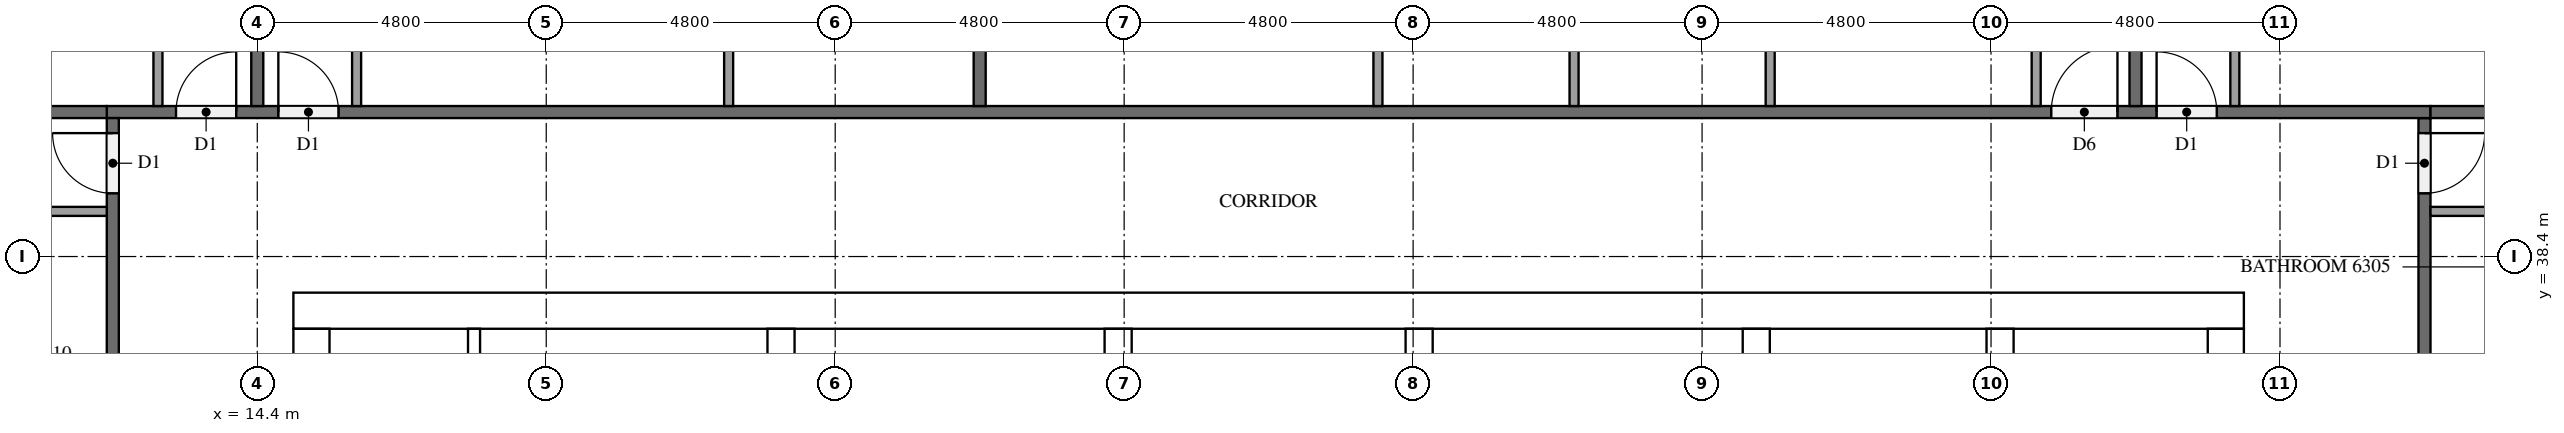
"""IFC4 building model, lengths in metres.
Left out: names, types, materials, properties, quantities, classifications, styles, units other than length and angle.
Written with IfcOpenShell. Run it as: python <this file> out.ifc"""

import sys

from ifc_helpers import new_model, si_unit, direction, frame, frame_2d, origin, place, context, subcontext, project, spatial, rectangle, extrude, element, fill, save


model = new_model("IFC4")
c1 = context("Model", 3, precision=1e-05, world=origin(), true_north=direction((0.0, 1.0)))
c2 = subcontext(c1, "Body", "Model", "MODEL_VIEW")
j1 = project(units=[si_unit("LENGTHUNIT", "METRE"), si_unit("PLANEANGLEUNIT", "RADIAN")], contexts=[c1])
p1 = place(None, origin())
s1 = spatial("IfcSite", under=j1, at=p1, CompositionType="ELEMENT")
p2 = place(p1, origin())
s2 = spatial("IfcBuilding", under=s1, at=p2, CompositionType="ELEMENT")
p3 = place(p2, frame((0.0, 0.0, 242.2)))
s3 = spatial("IfcBuildingStorey", under=s2, at=p3, CompositionType="ELEMENT", Elevation=242.2)
p4 = place(p3, frame((15.0, 37.5, 0.0), z_axis=(0.0, 0.0, 1.0), x_axis=(1.0, 0.0, 0.0)))
e1 = element("IfcWall", 1, at=p4, inside=s3, PredefinedType="SHEAR", context=c2, shape_type="SweptSolid", body=[
    extrude(rectangle(XDim=32.4, YDim=0.6, at=frame_2d((16.2, 0.0))), origin(), (0.0, 0.0, 1.0), 3.2),
])
p5 = place(p4, frame((15.3, 0.0, 0.0)))
e2 = element("IfcOpeningElement", 2, at=p5, cuts=e1, PredefinedType="OPENING", context=c2, shape_type="SweptSolid", body=[
    extrude(rectangle(XDim=1.8, YDim=2.1, at=frame_2d((0.9, 1.05))), frame((0.0, 0.31, 0.0), z_axis=(0.0, -1.0, 0.0), x_axis=(1.0, 0.0, 0.0)), (0.0, 0.0, 1.0), 0.62),
])
p6 = place(p4, frame((1.25, 0.0, 0.0)))
e3 = element("IfcOpeningElement", 3, at=p6, cuts=e1, PredefinedType="OPENING", context=c2, shape_type="SweptSolid", body=[
    extrude(rectangle(XDim=1.0, YDim=2.1, at=frame_2d((0.5, 1.05))), frame((0.0, 0.31, 0.0), z_axis=(0.0, -1.0, 0.0), x_axis=(1.0, 0.0, 0.0)), (0.0, 0.0, 1.0), 0.62),
])
p7 = place(p4, frame((4.988, 0.0, 0.0)))
e4 = element("IfcOpeningElement", 4, at=p7, cuts=e1, PredefinedType="OPENING", context=c2, shape_type="SweptSolid", body=[
    extrude(rectangle(XDim=1.0, YDim=2.1, at=frame_2d((0.5, 1.05))), frame((0.0, 0.31, 0.0), z_axis=(0.0, -1.0, 0.0), x_axis=(1.0, 0.0, 0.0)), (0.0, 0.0, 1.0), 0.62),
])
p8 = place(p3, frame((15.3, 15.6, 0.0), z_axis=(0.0, 0.0, 1.0), x_axis=(0.0, 1.0, 0.0)))
e5 = element("IfcWall", 5, at=p8, inside=s3, PredefinedType="SHEAR", context=c2, shape_type="SweptSolid", body=[
    extrude(rectangle(XDim=21.6, YDim=0.6, at=frame_2d((10.8, 0.0))), origin(), (0.0, 0.0, 1.0), 3.2),
])
p9 = place(p8, frame((5.16, 0.0, 0.0)))
e6 = element("IfcOpeningElement", 6, at=p9, cuts=e5, PredefinedType="OPENING", context=c2, shape_type="SweptSolid", body=[
    extrude(rectangle(XDim=1.2, YDim=2.1, at=frame_2d((0.6, 1.05))), frame((0.0, 0.31, 0.0), z_axis=(0.0, -1.0, 0.0), x_axis=(1.0, 0.0, 0.0)), (0.0, 0.0, 1.0), 0.62),
])
p10 = place(p3, frame((47.1, 15.6, 0.0), z_axis=(0.0, 0.0, 1.0), x_axis=(0.0, 1.0, 0.0)))
e7 = element("IfcWall", 7, at=p10, inside=s3, PredefinedType="SHEAR", context=c2, shape_type="SweptSolid", body=[
    extrude(rectangle(XDim=21.6, YDim=0.6, at=frame_2d((10.8, 0.0))), origin(), (0.0, 0.0, 1.0), 3.2),
])
p11 = place(p10, frame((10.5, 0.0, 0.0)))
e8 = element("IfcOpeningElement", 8, at=p11, cuts=e7, PredefinedType="OPENING", context=c2, shape_type="SweptSolid", body=[
    extrude(rectangle(XDim=1.2, YDim=2.1, at=frame_2d((0.6, 1.05))), frame((0.0, 0.31, 0.0), z_axis=(0.0, -1.0, 0.0), x_axis=(1.0, 0.0, 0.0)), (0.0, 0.0, 1.0), 0.62),
])
p12 = place(p3, frame((23.1, 15.6, 0.0), z_axis=(0.0, 0.0, 1.0), x_axis=(0.0, 1.0, 0.0)))
e9 = element("IfcWall", 9, at=p12, inside=s3, PredefinedType="SHEAR", context=c2, shape_type="SweptSolid", body=[
    extrude(rectangle(XDim=21.6, YDim=0.45, at=frame_2d((10.8, 0.0))), origin(), (0.0, 0.0, 1.0), 3.2),
])
p13 = place(p3, frame((39.3, 27.75, 0.0), z_axis=(0.0, 0.0, 1.0), x_axis=(0.0, 1.0, 0.0)))
e10 = element("IfcWall", 10, at=p13, inside=s3, PredefinedType="SHEAR", context=c2, shape_type="SweptSolid", body=[
    extrude(rectangle(XDim=9.45, YDim=0.45, at=frame_2d((4.725, 0.0))), origin(), (0.0, 0.0, 1.0), 3.2),
])
p14 = place(p3, frame((43.35, 27.75, 0.0), z_axis=(0.0, 0.0, 1.0), x_axis=(0.0, 1.0, 0.0)))
e11 = element("IfcWall", 11, at=p14, inside=s3, PredefinedType="SHEAR", context=c2, shape_type="SweptSolid", body=[
    extrude(rectangle(XDim=9.45, YDim=0.45, at=frame_2d((4.725, 0.0))), origin(), (0.0, 0.0, 1.0), 3.2),
])
p15 = place(p14, frame((7.65, 0.0, 0.0)))
e12 = element("IfcOpeningElement", 12, at=p15, cuts=e11, PredefinedType="OPENING", context=c2, shape_type="SweptSolid", body=[
    extrude(rectangle(XDim=1.2, YDim=2.1, at=frame_2d((0.6, 1.05))), frame((0.0, 0.235, 0.0), z_axis=(0.0, -1.0, 0.0), x_axis=(1.0, 0.0, 0.0)), (0.0, 0.0, 1.0), 0.47),
])
for number, where, z_axis, x_axis in (
    (13, (28.7, 33.775, 0.0), (0.0, 0.0, 1.0), (0.0, 1.0, 0.0)),
    (14, (33.7, 33.775, 0.0), (0.0, 0.0, 1.0), (0.0, 1.0, 0.0)),
):
    element("IfcWall", number, at=place(p3, frame(where, z_axis=z_axis, x_axis=x_axis)), inside=s3, PredefinedType="SHEAR", context=c2, shape_type="SweptSolid", body=[
        extrude(rectangle(XDim=3.425, YDim=0.45, at=frame_2d((1.712, 0.0))), origin(), (0.0, 0.0, 1.0), 3.2),
    ])
p16 = place(p3, frame((18.001, 31.475, 0.0), z_axis=(0.0, 0.0, 1.0), x_axis=(0.0, 1.0, 0.0)))
e15 = element("IfcWall", 15, at=p16, inside=s3, PredefinedType="PARTITIONING", context=c2, shape_type="SweptSolid", body=[
    extrude(rectangle(XDim=5.725, YDim=0.2, at=frame_2d((2.862, 0.0))), origin(), (0.0, 0.0, 1.0), 3.2),
])
p17 = place(p3, frame((50.4, 40.7, 0.0), z_axis=(0.0, 0.0, 1.0), x_axis=(0.0, -1.0, 0.0)))
e16 = element("IfcWall", 16, at=p17, inside=s3, PredefinedType="PARTITIONING", context=c2, shape_type="SweptSolid", body=[
    extrude(rectangle(XDim=28.6, YDim=0.2, at=frame_2d((14.3, 0.0))), origin(), (0.0, 0.0, 1.0), 3.2),
])
p18 = place(p17, frame((27.3, 0.0, 0.0)))
e17 = element("IfcOpeningElement", 17, at=p18, cuts=e16, PredefinedType="OPENING", context=c2, shape_type="SweptSolid", body=[
    extrude(rectangle(XDim=1.1, YDim=2.1, at=frame_2d((0.55, 1.05))), frame((0.0, 0.11, 0.0), z_axis=(0.0, -1.0, 0.0), x_axis=(1.0, 0.0, 0.0)), (0.0, 0.0, 1.0), 0.22),
])
p19 = place(p17, frame((0.25, 0.0, 0.0)))
e18 = element("IfcOpeningElement", 18, at=p19, cuts=e16, PredefinedType="OPENING", context=c2, shape_type="SweptSolid", body=[
    extrude(rectangle(XDim=1.0, YDim=2.1, at=frame_2d((0.5, 1.05))), frame((0.0, 0.11, 0.0), z_axis=(0.0, -1.0, 0.0), x_axis=(1.0, 0.0, 0.0)), (0.0, 0.0, 1.0), 0.22),
])
p20 = place(p3, frame((11.9, 40.8, 0.0), z_axis=(0.0, 0.0, 1.0), x_axis=(1.0, 0.0, 0.0)))
e19 = element("IfcWall", 19, at=p20, inside=s3, PredefinedType="PARTITIONING", context=c2, shape_type="SweptSolid", body=[
    extrude(rectangle(XDim=38.6, YDim=0.2, at=frame_2d((19.3, 0.0))), origin(), (0.0, 0.0, 1.0), 3.2),
])
p21 = place(p20, frame((34.05, 0.0, 0.0)))
e20 = element("IfcOpeningElement", 20, at=p21, cuts=e19, PredefinedType="OPENING", context=c2, shape_type="SweptSolid", body=[
    extrude(rectangle(XDim=1.0, YDim=2.1, at=frame_2d((0.5, 1.05))), frame((0.0, 0.11, 0.0), z_axis=(0.0, -1.0, 0.0), x_axis=(1.0, 0.0, 0.0)), (0.0, 0.0, 1.0), 0.22),
])
p22 = place(p20, frame((32.3, 0.0, 0.0)))
e21 = element("IfcOpeningElement", 21, at=p22, cuts=e19, PredefinedType="OPENING", context=c2, shape_type="SweptSolid", body=[
    extrude(rectangle(XDim=1.1, YDim=2.1, at=frame_2d((0.55, 1.05))), frame((0.0, 0.11, 0.0), z_axis=(0.0, -1.0, 0.0), x_axis=(1.0, 0.0, 0.0)), (0.0, 0.0, 1.0), 0.22),
])
p23 = place(p20, frame((2.85, 0.0, 0.0)))
e22 = element("IfcOpeningElement", 22, at=p23, cuts=e19, PredefinedType="OPENING", context=c2, shape_type="SweptSolid", body=[
    extrude(rectangle(XDim=1.0, YDim=2.1, at=frame_2d((0.5, 1.05))), frame((0.0, 0.11, 0.0), z_axis=(0.0, -1.0, 0.0), x_axis=(1.0, 0.0, 0.0)), (0.0, 0.0, 1.0), 0.22),
])
p24 = place(p20, frame((1.15, 0.0, 0.0)))
e23 = element("IfcOpeningElement", 23, at=p24, cuts=e19, PredefinedType="OPENING", context=c2, shape_type="SweptSolid", body=[
    extrude(rectangle(XDim=1.0, YDim=2.1, at=frame_2d((0.5, 1.05))), frame((0.0, 0.11, 0.0), z_axis=(0.0, -1.0, 0.0), x_axis=(1.0, 0.0, 0.0)), (0.0, 0.0, 1.0), 0.22),
])
p25 = place(p3, frame((12.0, 12.1, 0.0), z_axis=(0.0, 0.0, 1.0), x_axis=(0.0, 1.0, 0.0)))
e24 = element("IfcWall", 24, at=p25, inside=s3, PredefinedType="PARTITIONING", context=c2, shape_type="SweptSolid", body=[
    extrude(rectangle(XDim=28.6, YDim=0.2, at=frame_2d((14.3, 0.0))), origin(), (0.0, 0.0, 1.0), 3.2),
])
p26 = place(p25, frame((27.35, 0.0, 0.0)))
e25 = element("IfcOpeningElement", 25, at=p26, cuts=e24, PredefinedType="OPENING", context=c2, shape_type="SweptSolid", body=[
    extrude(rectangle(XDim=1.0, YDim=2.1, at=frame_2d((0.5, 1.05))), frame((0.0, 0.11, 0.0), z_axis=(0.0, -1.0, 0.0), x_axis=(1.0, 0.0, 0.0)), (0.0, 0.0, 1.0), 0.22),
])
p27 = place(p25, frame((17.75, 0.0, 0.0)))
e26 = element("IfcOpeningElement", 26, at=p27, cuts=e24, PredefinedType="OPENING", context=c2, shape_type="SweptSolid", body=[
    extrude(rectangle(XDim=1.0, YDim=2.1, at=frame_2d((0.5, 1.05))), frame((0.0, 0.11, 0.0), z_axis=(0.0, -1.0, 0.0), x_axis=(1.0, 0.0, 0.0)), (0.0, 0.0, 1.0), 0.22),
])
p28 = place(p25, frame((3.35, 0.0, 0.0)))
e27 = element("IfcOpeningElement", 27, at=p28, cuts=e24, PredefinedType="OPENING", context=c2, shape_type="SweptSolid", body=[
    extrude(rectangle(XDim=1.0, YDim=2.1, at=frame_2d((0.5, 1.05))), frame((0.0, 0.11, 0.0), z_axis=(0.0, -1.0, 0.0), x_axis=(1.0, 0.0, 0.0)), (0.0, 0.0, 1.0), 0.22),
])
p29 = place(p3, frame((50.5, 40.8, 0.0), z_axis=(0.0, 0.0, 1.0), x_axis=(1.0, 0.0, 0.0)))
e28 = element("IfcWall", 28, at=p29, inside=s3, PredefinedType="PARTITIONING", context=c2, shape_type="SweptSolid", body=[
    extrude(rectangle(XDim=7.0, YDim=0.2, at=frame_2d((3.5, 0.0))), origin(), (0.0, 0.0, 1.0), 3.2),
])
for number, where, z_axis, x_axis in (
    (29, (45.6, 52.7, 0.0), (0.0, 0.0, 1.0), (0.0, -1.0, 0.0)),
    (30, (26.4, 52.7, 0.0), (0.0, 0.0, 1.0), (0.0, -1.0, 0.0)),
):
    element("IfcWall", number, at=place(p3, frame(where, z_axis=z_axis, x_axis=x_axis)), inside=s3, PredefinedType="PARTITIONING", context=c2, shape_type="SweptSolid", body=[
        extrude(rectangle(XDim=11.8, YDim=0.2, at=frame_2d((5.9, 0.0))), origin(), (0.0, 0.0, 1.0), 3.2),
    ])
p30 = place(p3, frame((14.4, 52.525, 0.0), z_axis=(0.0, 0.0, 1.0), x_axis=(0.0, -1.0, 0.0)))
e31 = element("IfcWall", 31, at=p30, inside=s3, PredefinedType="PARTITIONING", context=c2, shape_type="SweptSolid", body=[
    extrude(rectangle(XDim=11.625, YDim=0.2, at=frame_2d((5.812, 0.0))), origin(), (0.0, 0.0, 1.0), 3.2),
])
p31 = place(p3, frame((0.1, 40.8, 0.0), z_axis=(0.0, 0.0, 1.0), x_axis=(1.0, 0.0, 0.0)))
e32 = element("IfcWall", 32, at=p31, inside=s3, PredefinedType="PARTITIONING", context=c2, shape_type="SweptSolid", body=[
    extrude(rectangle(XDim=11.8, YDim=0.2, at=frame_2d((5.9, 0.0))), origin(), (0.0, 0.0, 1.0), 3.2),
])
p32 = place(p3, frame((50.5, 39.15, 0.0), z_axis=(0.0, 0.0, 1.0), x_axis=(1.0, 0.0, 0.0)))
e33 = element("IfcWall", 33, at=p32, inside=s3, PredefinedType="PARTITIONING", context=c2, shape_type="SweptSolid", body=[
    extrude(rectangle(XDim=1.925, YDim=0.15, at=frame_2d((0.962, 0.0))), origin(), (0.0, 0.0, 1.0), 3.2),
])
p33 = place(p3, frame((47.25, 40.9, 0.0), z_axis=(0.0, 0.0, 1.0), x_axis=(0.0, 1.0, 0.0)))
e34 = element("IfcWall", 34, at=p33, inside=s3, PredefinedType="PARTITIONING", context=c2, shape_type="SweptSolid", body=[
    extrude(rectangle(XDim=4.325, YDim=0.15, at=frame_2d((2.163, 0.0))), origin(), (0.0, 0.0, 1.0), 3.2),
])
for number, where, z_axis, x_axis in (
    (35, (39.531, 40.9, 0.0), (0.0, 0.0, 1.0), (0.0, 1.0, 0.0)),
    (36, (36.273, 40.9, 0.0), (0.0, 0.0, 1.0), (0.0, 1.0, 0.0)),
    (37, (33.016, 40.9, 0.0), (0.0, 0.0, 1.0), (0.0, 1.0, 0.0)),
):
    element("IfcWall", number, at=place(p3, frame(where, z_axis=z_axis, x_axis=x_axis)), inside=s3, PredefinedType="PARTITIONING", context=c2, shape_type="SweptSolid", body=[
        extrude(rectangle(XDim=3.875, YDim=0.15, at=frame_2d((1.938, 0.0))), origin(), (0.0, 0.0, 1.0), 3.2),
    ])
p34 = place(p3, frame((43.95, 40.9, 0.0), z_axis=(0.0, 0.0, 1.0), x_axis=(0.0, 1.0, 0.0)))
e38 = element("IfcWall", 38, at=p34, inside=s3, PredefinedType="PARTITIONING", context=c2, shape_type="SweptSolid", body=[
    extrude(rectangle(XDim=4.025, YDim=0.15, at=frame_2d((2.013, 0.0))), origin(), (0.0, 0.0, 1.0), 3.2),
])
p35 = place(p3, frame((22.23, 40.9, 0.0), z_axis=(0.0, 0.0, 1.0), x_axis=(0.0, 1.0, 0.0)))
e39 = element("IfcWall", 39, at=p35, inside=s3, PredefinedType="PARTITIONING", context=c2, shape_type="SweptSolid", body=[
    extrude(rectangle(XDim=3.875, YDim=0.15, at=frame_2d((1.938, 0.0))), origin(), (0.0, 0.0, 1.0), 3.2),
])
p36 = place(p3, frame((16.05, 40.9, 0.0), z_axis=(0.0, 0.0, 1.0), x_axis=(0.0, 1.0, 0.0)))
e40 = element("IfcWall", 40, at=p36, inside=s3, PredefinedType="PARTITIONING", context=c2, shape_type="SweptSolid", body=[
    extrude(rectangle(XDim=4.025, YDim=0.15, at=frame_2d((2.013, 0.0))), origin(), (0.0, 0.0, 1.0), 3.2),
])
p37 = place(p3, frame((12.75, 40.9, 0.0), z_axis=(0.0, 0.0, 1.0), x_axis=(0.0, 1.0, 0.0)))
e41 = element("IfcWall", 41, at=p37, inside=s3, PredefinedType="PARTITIONING", context=c2, shape_type="SweptSolid", body=[
    extrude(rectangle(XDim=3.725, YDim=0.15, at=frame_2d((1.863, 0.0))), origin(), (0.0, 0.0, 1.0), 3.2),
])
p38 = place(p3, frame((11.9, 39.15, 0.0), z_axis=(0.0, 0.0, 1.0), x_axis=(-1.0, 0.0, 0.0)))
e42 = element("IfcWall", 42, at=p38, inside=s3, PredefinedType="PARTITIONING", context=c2, shape_type="SweptSolid", body=[
    extrude(rectangle(XDim=3.425, YDim=0.15, at=frame_2d((1.712, 0.0))), origin(), (0.0, 0.0, 1.0), 3.2),
])
p39 = place(p5, origin())
e43 = element("IfcDoor", 43, at=p39, inside=s3, OperationType="DOUBLE_DOOR_SINGLE_SWING", PredefinedType="DOOR", context=c2, shape_type="SweptSolid", body=[
    extrude(rectangle(XDim=1.8, YDim=2.1, at=frame_2d((0.9, 1.05))), frame((0.0, 0.025, 0.0), z_axis=(0.0, -1.0, 0.0), x_axis=(1.0, 0.0, 0.0)), (0.0, 0.0, 1.0), 0.05),
])
fill(e2, e43)
p40 = place(p6, origin())
e44 = element("IfcDoor", 44, at=p40, inside=s3, OperationType="SINGLE_SWING_RIGHT", PredefinedType="DOOR", context=c2, shape_type="SweptSolid", body=[
    extrude(rectangle(XDim=1.0, YDim=2.1, at=frame_2d((0.5, 1.05))), frame((0.0, 0.025, 0.0), z_axis=(0.0, -1.0, 0.0), x_axis=(1.0, 0.0, 0.0)), (0.0, 0.0, 1.0), 0.05),
])
fill(e3, e44)
p41 = place(p7, origin())
e45 = element("IfcDoor", 45, at=p41, inside=s3, OperationType="SINGLE_SWING_LEFT", PredefinedType="DOOR", context=c2, shape_type="SweptSolid", body=[
    extrude(rectangle(XDim=1.0, YDim=2.1, at=frame_2d((0.5, 1.05))), frame((0.0, 0.025, 0.0), z_axis=(0.0, -1.0, 0.0), x_axis=(1.0, 0.0, 0.0)), (0.0, 0.0, 1.0), 0.05),
])
fill(e4, e45)
p42 = place(p19, origin())
e46 = element("IfcDoor", 46, at=p42, inside=s3, OperationType="SINGLE_SWING_LEFT", PredefinedType="DOOR", context=c2, shape_type="SweptSolid", body=[
    extrude(rectangle(XDim=1.0, YDim=2.1, at=frame_2d((0.5, 1.05))), frame((0.0, 0.025, 0.0), z_axis=(0.0, -1.0, 0.0), x_axis=(1.0, 0.0, 0.0)), (0.0, 0.0, 1.0), 0.05),
])
fill(e18, e46)
p43 = place(p21, origin())
e47 = element("IfcDoor", 47, at=p43, inside=s3, OperationType="SINGLE_SWING_LEFT", PredefinedType="DOOR", context=c2, shape_type="SweptSolid", body=[
    extrude(rectangle(XDim=1.0, YDim=2.1, at=frame_2d((0.5, 1.05))), frame((0.0, 0.025, 0.0), z_axis=(0.0, -1.0, 0.0), x_axis=(1.0, 0.0, 0.0)), (0.0, 0.0, 1.0), 0.05),
])
fill(e20, e47)
p44 = place(p22, origin())
e48 = element("IfcDoor", 48, at=p44, inside=s3, OperationType="SINGLE_SWING_RIGHT", PredefinedType="DOOR", context=c2, shape_type="SweptSolid", body=[
    extrude(rectangle(XDim=1.1, YDim=2.1, at=frame_2d((0.55, 1.05))), frame((0.0, 0.025, 0.0), z_axis=(0.0, -1.0, 0.0), x_axis=(1.0, 0.0, 0.0)), (0.0, 0.0, 1.0), 0.05),
])
fill(e21, e48)
p45 = place(p23, origin())
e49 = element("IfcDoor", 49, at=p45, inside=s3, OperationType="SINGLE_SWING_LEFT", PredefinedType="DOOR", context=c2, shape_type="SweptSolid", body=[
    extrude(rectangle(XDim=1.0, YDim=2.1, at=frame_2d((0.5, 1.05))), frame((0.0, 0.025, 0.0), z_axis=(0.0, -1.0, 0.0), x_axis=(1.0, 0.0, 0.0)), (0.0, 0.0, 1.0), 0.05),
])
fill(e22, e49)
p46 = place(p24, origin())
e50 = element("IfcDoor", 50, at=p46, inside=s3, OperationType="SINGLE_SWING_RIGHT", PredefinedType="DOOR", context=c2, shape_type="SweptSolid", body=[
    extrude(rectangle(XDim=1.0, YDim=2.1, at=frame_2d((0.5, 1.05))), frame((0.0, 0.025, 0.0), z_axis=(0.0, -1.0, 0.0), x_axis=(1.0, 0.0, 0.0)), (0.0, 0.0, 1.0), 0.05),
])
fill(e23, e50)
p47 = place(p26, origin())
e51 = element("IfcDoor", 51, at=p47, inside=s3, OperationType="SINGLE_SWING_RIGHT", PredefinedType="DOOR", context=c2, shape_type="SweptSolid", body=[
    extrude(rectangle(XDim=1.0, YDim=2.1, at=frame_2d((0.5, 1.05))), frame((0.0, 0.025, 0.0), z_axis=(0.0, -1.0, 0.0), x_axis=(1.0, 0.0, 0.0)), (0.0, 0.0, 1.0), 0.05),
])
fill(e25, e51)
save(model, sys.argv[1])
